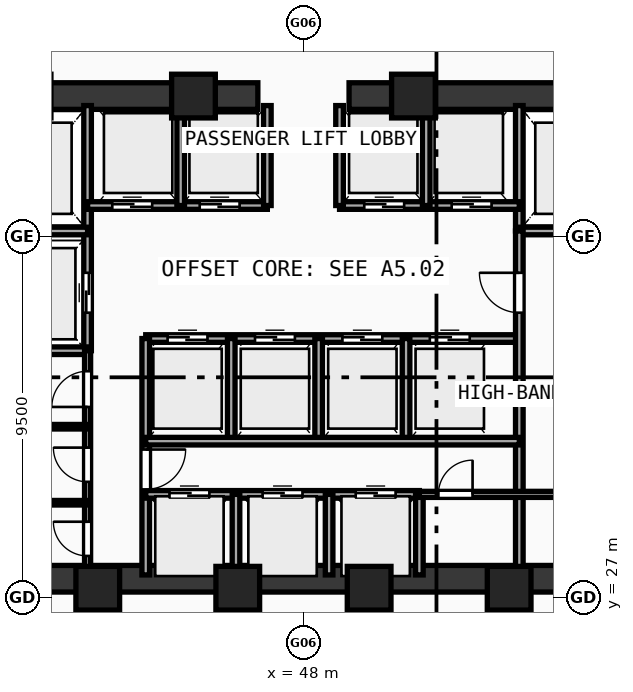
"""IFC4 building model, lengths in metres.
Left out: names, types, materials, properties, quantities, classifications, styles, units other than length and angle.
Written with IfcOpenShell. Run it as: python <this file> out.ifc"""

import sys

from ifc_helpers import new_model, si_unit, direction, frame, frame_2d, origin, origin_with_axes, origin_2d, place, context, subcontext, project, spatial, rectangle, hollow_rectangle, extrude, source, transform, mapped, element, fill, save


model = new_model("IFC4")
c1 = context("Model", 3, precision=1e-05, world=origin(), true_north=direction((0.0, 1.0)))
c2 = subcontext(c1, "Body", "Model", "MODEL_VIEW")
j1 = project(units=[si_unit("LENGTHUNIT", "METRE"), si_unit("PLANEANGLEUNIT", "RADIAN")], contexts=[c1])
p1 = place(None, origin())
s1 = spatial("IfcSite", under=j1, at=p1, CompositionType="ELEMENT")
p2 = place(p1, origin())
s2 = spatial("IfcBuilding", under=s1, at=p2, CompositionType="ELEMENT")
p3 = place(p2, origin())
s3 = spatial("IfcBuildingStorey", under=s2, at=p3, CompositionType="ELEMENT", Elevation=0.0)
p4 = place(p3, frame((35.45, 27.5, 0.0), z_axis=(0.0, 0.0, 1.0), x_axis=(1.0, 0.0, 0.0)))
e1 = element("IfcWall", 1, at=p4, inside=s3, PredefinedType="SHEAR", context=c2, shape_type="SweptSolid", body=[
    extrude(rectangle(XDim=25.1, YDim=0.7, at=frame_2d((12.55, 0.0))), origin(), (0.0, 0.0, 1.0), 4.52),
])
p5 = place(p3, frame((35.45, 40.2, 0.0), z_axis=(0.0, 0.0, 1.0), x_axis=(1.0, 0.0, 0.0)))
e2 = element("IfcWall", 2, at=p5, inside=s3, PredefinedType="SHEAR", context=c2, shape_type="SweptSolid", body=[
    extrude(rectangle(XDim=11.35, YDim=0.7, at=frame_2d((5.675, 0.0))), origin(), (0.0, 0.0, 1.0), 4.52),
])
p6 = place(p5, frame((1.7, 0.0, 0.0)))
e3 = element("IfcOpeningElement", 3, at=p6, cuts=e2, PredefinedType="OPENING", context=c2, shape_type="SweptSolid", body=[
    extrude(rectangle(XDim=1.05, YDim=2.1, at=frame_2d((0.525, 1.05))), frame((0.0, 0.36, 0.0), z_axis=(0.0, -1.0, 0.0), x_axis=(1.0, 0.0, 0.0)), (0.0, 0.0, 1.0), 0.72),
])
p7 = place(p3, frame((49.2, 40.2, 0.0), z_axis=(0.0, 0.0, 1.0), x_axis=(1.0, 0.0, 0.0)))
e4 = element("IfcWall", 4, at=p7, inside=s3, PredefinedType="SHEAR", context=c2, shape_type="SweptSolid", body=[
    extrude(rectangle(XDim=11.35, YDim=0.7, at=frame_2d((5.675, 0.0))), origin(), (0.0, 0.0, 1.0), 4.52),
])
p8 = place(p7, frame((8.6, 0.0, 0.0)))
e5 = element("IfcOpeningElement", 5, at=p8, cuts=e4, PredefinedType="OPENING", context=c2, shape_type="SweptSolid", body=[
    extrude(rectangle(XDim=1.05, YDim=2.1, at=frame_2d((0.525, 1.05))), frame((0.0, 0.36, 0.0), z_axis=(0.0, -1.0, 0.0), x_axis=(1.0, 0.0, 0.0)), (0.0, 0.0, 1.0), 0.72),
])
m1 = source(origin(), c2, "Body", "SweptSolid", [
    extrude(hollow_rectangle(XDim=1.15, YDim=1.15, WallThickness=0.048, at=origin_2d()), origin(), (0.0, 0.0, 1.0), 4.8),
])
for number, where, z_axis, x_axis in (
    (6, (42.588, 27.25, -0.28), (0.0, 0.0, 1.0), (1.0, 0.0, 0.0)),
    (7, (46.272, 27.25, -0.28), (0.0, 0.0, 1.0), (1.0, 0.0, 0.0)),
    (8, (49.729, 27.25, -0.28), (0.0, 0.0, 1.0), (1.0, 0.0, 0.0)),
    (9, (53.412, 27.25, -0.28), (0.0, 0.0, 1.0), (1.0, 0.0, 0.0)),
    (10, (50.894, 40.2, -0.28), (0.0, 0.0, 1.0), (1.0, 0.0, 0.0)),
    (11, (45.106, 40.2, -0.28), (0.0, 0.0, 1.0), (1.0, 0.0, 0.0)),
):
    element("IfcColumn", number, at=place(p3, frame(where, z_axis=z_axis, x_axis=x_axis)), inside=s3, PredefinedType="COLUMN", context=c2, shape_type="MappedRepresentation", body=[
        mapped(m1, transform((0.0, 0.0, 0.0), scale=1.0)),
    ])
p9 = place(p3, frame((42.32, 33.5, 0.0), z_axis=(0.0, 0.0, 1.0), x_axis=(0.0, 1.0, 0.0)))
e12 = element("IfcWall", 12, at=p9, inside=s3, PredefinedType="SOLIDWALL", context=c2, shape_type="SweptSolid", body=[
    extrude(rectangle(XDim=6.45, YDim=0.2, at=frame_2d((3.225, 0.0))), origin(), (0.0, 0.0, 1.0), 4.52),
])
p10 = place(p9, frame((1.0, 0.0, 0.0)))
e13 = element("IfcOpeningElement", 13, at=p10, cuts=e12, PredefinedType="OPENING", context=c2, shape_type="SweptSolid", body=[
    extrude(rectangle(XDim=1.05, YDim=2.1, at=frame_2d((0.525, 1.05))), frame((0.0, 0.11, 0.0), z_axis=(0.0, -1.0, 0.0), x_axis=(1.0, 0.0, 0.0)), (0.0, 0.0, 1.0), 0.22),
])
for number, where, z_axis, x_axis in (
    (14, (39.6, 36.65, 0.0), (0.0, 0.0, 1.0), (1.0, 0.0, 0.0)),
    (15, (39.6, 33.5, 0.0), (0.0, 0.0, 1.0), (1.0, 0.0, 0.0)),
):
    element("IfcWall", number, at=place(p3, frame(where, z_axis=z_axis, x_axis=x_axis)), inside=s3, PredefinedType="SOLIDWALL", context=c2, shape_type="SweptSolid", body=[
        extrude(rectangle(XDim=2.72, YDim=0.2, at=frame_2d((1.36, 0.0))), origin(), (0.0, 0.0, 1.0), 4.52),
    ])
p11 = place(p3, frame((53.68, 36.65, 0.0), z_axis=(0.0, 0.0, 1.0), x_axis=(0.0, 1.0, 0.0)))
e16 = element("IfcWall", 16, at=p11, inside=s3, PredefinedType="SOLIDWALL", context=c2, shape_type="SweptSolid", body=[
    extrude(rectangle(XDim=3.3, YDim=0.2, at=frame_2d((1.65, 0.0))), origin(), (0.0, 0.0, 1.0), 4.52),
])
p12 = place(p3, frame((53.68, 36.65, 0.0), z_axis=(0.0, 0.0, 1.0), x_axis=(1.0, 0.0, 0.0)))
e17 = element("IfcWall", 17, at=p12, inside=s3, PredefinedType="SOLIDWALL", context=c2, shape_type="SweptSolid", body=[
    extrude(rectangle(XDim=2.72, YDim=0.2, at=frame_2d((1.36, 0.0))), origin(), (0.0, 0.0, 1.0), 4.52),
])
p13 = place(p3, frame((42.32, 37.32, 0.0), z_axis=(0.0, 0.0, 1.0), x_axis=(1.0, 0.0, 0.0)))
e18 = element("IfcWall", 18, at=p13, inside=s3, PredefinedType="SOLIDWALL", context=c2, shape_type="SweptSolid", body=[
    extrude(rectangle(XDim=4.73, YDim=0.2, at=frame_2d((2.365, 0.0))), origin(), (0.0, 0.0, 1.0), 4.52),
])
p14 = place(p13, frame((0.65, 0.0, 0.0)))
e19 = element("IfcOpeningElement", 19, at=p14, cuts=e18, PredefinedType="OPENING", context=c2, shape_type="SweptSolid", body=[
    extrude(rectangle(XDim=1.05, YDim=2.1, at=frame_2d((0.525, 1.05))), frame((0.0, 0.11, 0.0), z_axis=(0.0, -1.0, 0.0), x_axis=(1.0, 0.0, 0.0)), (0.0, 0.0, 1.0), 0.22),
])
p15 = place(p13, frame((2.95, 0.0, 0.0)))
e20 = element("IfcOpeningElement", 20, at=p15, cuts=e18, PredefinedType="OPENING", context=c2, shape_type="SweptSolid", body=[
    extrude(rectangle(XDim=1.05, YDim=2.1, at=frame_2d((0.525, 1.05))), frame((0.0, 0.11, 0.0), z_axis=(0.0, -1.0, 0.0), x_axis=(1.0, 0.0, 0.0)), (0.0, 0.0, 1.0), 0.22),
])
p16 = place(p3, frame((48.95, 37.32, 0.0), z_axis=(0.0, 0.0, 1.0), x_axis=(1.0, 0.0, 0.0)))
e21 = element("IfcWall", 21, at=p16, inside=s3, PredefinedType="SOLIDWALL", context=c2, shape_type="SweptSolid", body=[
    extrude(rectangle(XDim=4.73, YDim=0.2, at=frame_2d((2.365, 0.0))), origin(), (0.0, 0.0, 1.0), 4.52),
])
p17 = place(p16, frame((0.65, 0.0, 0.0)))
e22 = element("IfcOpeningElement", 22, at=p17, cuts=e21, PredefinedType="OPENING", context=c2, shape_type="SweptSolid", body=[
    extrude(rectangle(XDim=1.05, YDim=2.1, at=frame_2d((0.525, 1.05))), frame((0.0, 0.11, 0.0), z_axis=(0.0, -1.0, 0.0), x_axis=(1.0, 0.0, 0.0)), (0.0, 0.0, 1.0), 0.22),
])
p18 = place(p16, frame((2.95, 0.0, 0.0)))
e23 = element("IfcOpeningElement", 23, at=p18, cuts=e21, PredefinedType="OPENING", context=c2, shape_type="SweptSolid", body=[
    extrude(rectangle(XDim=1.05, YDim=2.1, at=frame_2d((0.525, 1.05))), frame((0.0, 0.11, 0.0), z_axis=(0.0, -1.0, 0.0), x_axis=(1.0, 0.0, 0.0)), (0.0, 0.0, 1.0), 0.22),
])
for number, where, z_axis, x_axis in (
    (24, (47.05, 37.32, 0.0), (0.0, 0.0, 1.0), (0.0, 1.0, 0.0)),
    (25, (48.95, 37.32, 0.0), (0.0, 0.0, 1.0), (0.0, 1.0, 0.0)),
    (26, (44.77, 37.32, 0.0), (0.0, 0.0, 1.0), (0.0, 1.0, 0.0)),
    (27, (51.23, 37.32, 0.0), (0.0, 0.0, 1.0), (0.0, 1.0, 0.0)),
):
    element("IfcWall", number, at=place(p3, frame(where, z_axis=z_axis, x_axis=x_axis)), inside=s3, PredefinedType="SOLIDWALL", context=c2, shape_type="SweptSolid", body=[
        extrude(rectangle(XDim=2.63, YDim=0.2, at=frame_2d((1.315, 0.0))), origin(), (0.0, 0.0, 1.0), 4.52),
    ])
p19 = place(p3, frame((43.85, 33.82, 0.0), z_axis=(0.0, 0.0, 1.0), x_axis=(1.0, 0.0, 0.0)))
e28 = element("IfcWall", 28, at=p19, inside=s3, PredefinedType="SOLIDWALL", context=c2, shape_type="SweptSolid", body=[
    extrude(rectangle(XDim=9.83, YDim=0.2, at=frame_2d((4.915, 0.0))), origin(), (0.0, 0.0, 1.0), 4.52),
])
p20 = place(p19, frame((0.575, 0.0, 0.0)))
e29 = element("IfcOpeningElement", 29, at=p20, cuts=e28, PredefinedType="OPENING", context=c2, shape_type="SweptSolid", body=[
    extrude(rectangle(XDim=1.05, YDim=2.1, at=frame_2d((0.525, 1.05))), frame((0.0, 0.11, 0.0), z_axis=(0.0, -1.0, 0.0), x_axis=(1.0, 0.0, 0.0)), (0.0, 0.0, 1.0), 0.22),
])
p21 = place(p19, frame((2.875, 0.0, 0.0)))
e30 = element("IfcOpeningElement", 30, at=p21, cuts=e28, PredefinedType="OPENING", context=c2, shape_type="SweptSolid", body=[
    extrude(rectangle(XDim=1.05, YDim=2.1, at=frame_2d((0.525, 1.05))), frame((0.0, 0.11, 0.0), z_axis=(0.0, -1.0, 0.0), x_axis=(1.0, 0.0, 0.0)), (0.0, 0.0, 1.0), 0.22),
])
p22 = place(p19, frame((5.175, 0.0, 0.0)))
e31 = element("IfcOpeningElement", 31, at=p22, cuts=e28, PredefinedType="OPENING", context=c2, shape_type="SweptSolid", body=[
    extrude(rectangle(XDim=1.05, YDim=2.1, at=frame_2d((0.525, 1.05))), frame((0.0, 0.11, 0.0), z_axis=(0.0, -1.0, 0.0), x_axis=(1.0, 0.0, 0.0)), (0.0, 0.0, 1.0), 0.22),
])
p23 = place(p19, frame((7.475, 0.0, 0.0)))
e32 = element("IfcOpeningElement", 32, at=p23, cuts=e28, PredefinedType="OPENING", context=c2, shape_type="SweptSolid", body=[
    extrude(rectangle(XDim=1.05, YDim=2.1, at=frame_2d((0.525, 1.05))), frame((0.0, 0.11, 0.0), z_axis=(0.0, -1.0, 0.0), x_axis=(1.0, 0.0, 0.0)), (0.0, 0.0, 1.0), 0.22),
])
p24 = place(p3, frame((43.85, 27.6, 0.0), z_axis=(0.0, 0.0, 1.0), x_axis=(0.0, 1.0, 0.0)))
e33 = element("IfcWall", 33, at=p24, inside=s3, PredefinedType="SOLIDWALL", context=c2, shape_type="SweptSolid", body=[
    extrude(rectangle(XDim=6.22, YDim=0.2, at=frame_2d((3.11, 0.0))), origin(), (0.0, 0.0, 1.0), 4.52),
])
p25 = place(p24, frame((2.25, 0.0, 0.0)))
e34 = element("IfcOpeningElement", 34, at=p25, cuts=e33, PredefinedType="OPENING", context=c2, shape_type="SweptSolid", body=[
    extrude(rectangle(XDim=1.05, YDim=2.1, at=frame_2d((0.525, 1.05))), frame((0.0, 0.11, 0.0), z_axis=(0.0, -1.0, 0.0), x_axis=(1.0, 0.0, 0.0)), (0.0, 0.0, 1.0), 0.22),
])
p26 = place(p3, frame((53.68, 27.6, 0.0), z_axis=(0.0, 0.0, 1.0), x_axis=(0.0, 1.0, 0.0)))
e35 = element("IfcWall", 35, at=p26, inside=s3, PredefinedType="SOLIDWALL", context=c2, shape_type="SweptSolid", body=[
    extrude(rectangle(XDim=9.05, YDim=0.2, at=frame_2d((4.525, 0.0))), origin(), (0.0, 0.0, 1.0), 4.52),
])
p27 = place(p26, frame((6.9, 0.0, 0.0)))
e36 = element("IfcOpeningElement", 36, at=p27, cuts=e35, PredefinedType="OPENING", context=c2, shape_type="SweptSolid", body=[
    extrude(rectangle(XDim=1.05, YDim=2.1, at=frame_2d((0.525, 1.05))), frame((0.0, 0.11, 0.0), z_axis=(0.0, -1.0, 0.0), x_axis=(1.0, 0.0, 0.0)), (0.0, 0.0, 1.0), 0.22),
])
for number, where, z_axis, x_axis in (
    (37, (46.1, 31.12, 0.0), (0.0, 0.0, 1.0), (0.0, 1.0, 0.0)),
    (38, (48.4, 31.12, 0.0), (0.0, 0.0, 1.0), (0.0, 1.0, 0.0)),
    (39, (50.7, 31.12, 0.0), (0.0, 0.0, 1.0), (0.0, 1.0, 0.0)),
):
    element("IfcWall", number, at=place(p3, frame(where, z_axis=z_axis, x_axis=x_axis)), inside=s3, PredefinedType="SOLIDWALL", context=c2, shape_type="SweptSolid", body=[
        extrude(rectangle(XDim=2.7, YDim=0.2, at=frame_2d((1.35, 0.0))), origin(), (0.0, 0.0, 1.0), 4.52),
    ])
p28 = place(p3, frame((43.85, 29.72, 0.0), z_axis=(0.0, 0.0, 1.0), x_axis=(1.0, 0.0, 0.0)))
e40 = element("IfcWall", 40, at=p28, inside=s3, PredefinedType="SOLIDWALL", context=c2, shape_type="SweptSolid", body=[
    extrude(rectangle(XDim=7.2, YDim=0.2, at=frame_2d((3.6, 0.0))), origin(), (0.0, 0.0, 1.0), 4.52),
])
p29 = place(p28, frame((0.625, 0.0, 0.0)))
e41 = element("IfcOpeningElement", 41, at=p29, cuts=e40, PredefinedType="OPENING", context=c2, shape_type="SweptSolid", body=[
    extrude(rectangle(XDim=1.05, YDim=2.1, at=frame_2d((0.525, 1.05))), frame((0.0, 0.11, 0.0), z_axis=(0.0, -1.0, 0.0), x_axis=(1.0, 0.0, 0.0)), (0.0, 0.0, 1.0), 0.22),
])
p30 = place(p28, frame((3.075, 0.0, 0.0)))
e42 = element("IfcOpeningElement", 42, at=p30, cuts=e40, PredefinedType="OPENING", context=c2, shape_type="SweptSolid", body=[
    extrude(rectangle(XDim=1.05, YDim=2.1, at=frame_2d((0.525, 1.05))), frame((0.0, 0.11, 0.0), z_axis=(0.0, -1.0, 0.0), x_axis=(1.0, 0.0, 0.0)), (0.0, 0.0, 1.0), 0.22),
])
p31 = place(p28, frame((5.525, 0.0, 0.0)))
e43 = element("IfcOpeningElement", 43, at=p31, cuts=e40, PredefinedType="OPENING", context=c2, shape_type="SweptSolid", body=[
    extrude(rectangle(XDim=1.05, YDim=2.1, at=frame_2d((0.525, 1.05))), frame((0.0, 0.11, 0.0), z_axis=(0.0, -1.0, 0.0), x_axis=(1.0, 0.0, 0.0)), (0.0, 0.0, 1.0), 0.22),
])
p32 = place(p3, frame((51.05, 27.6, 0.0), z_axis=(0.0, 0.0, 1.0), x_axis=(0.0, 1.0, 0.0)))
e44 = element("IfcWall", 44, at=p32, inside=s3, PredefinedType="SOLIDWALL", context=c2, shape_type="SweptSolid", body=[
    extrude(rectangle(XDim=2.12, YDim=0.2, at=frame_2d((1.06, 0.0))), origin(), (0.0, 0.0, 1.0), 4.52),
])
p33 = place(p3, frame((43.85, 31.12, 0.0), z_axis=(0.0, 0.0, 1.0), x_axis=(1.0, 0.0, 0.0)))
e45 = element("IfcWall", 45, at=p33, inside=s3, PredefinedType="SOLIDWALL", context=c2, shape_type="SweptSolid", body=[
    extrude(rectangle(XDim=9.83, YDim=0.2, at=frame_2d((4.915, 0.0))), origin(), (0.0, 0.0, 1.0), 4.52),
])
for number, where, z_axis, x_axis in (
    (46, (46.225, 27.6, 0.0), (0.0, 0.0, 1.0), (0.0, 1.0, 0.0)),
    (47, (48.675, 27.6, 0.0), (0.0, 0.0, 1.0), (0.0, 1.0, 0.0)),
):
    element("IfcWall", number, at=place(p3, frame(where, z_axis=z_axis, x_axis=x_axis)), inside=s3, PredefinedType="SOLIDWALL", context=c2, shape_type="SweptSolid", body=[
        extrude(rectangle(XDim=2.12, YDim=0.2, at=frame_2d((1.06, 0.0))), origin(), (0.0, 0.0, 1.0), 4.52),
    ])
p34 = place(p3, frame((42.32, 27.6, 0.0), z_axis=(0.0, 0.0, 1.0), x_axis=(0.0, 1.0, 0.0)))
e48 = element("IfcWall", 48, at=p34, inside=s3, PredefinedType="PARTITIONING", context=c2, shape_type="SweptSolid", body=[
    extrude(rectangle(XDim=5.9, YDim=0.16, at=frame_2d((2.95, 0.0))), origin(), (0.0, 0.0, 1.0), 4.52),
])
p35 = place(p34, frame((0.5, 0.0, 0.0)))
e49 = element("IfcOpeningElement", 49, at=p35, cuts=e48, PredefinedType="OPENING", context=c2, shape_type="SweptSolid", body=[
    extrude(rectangle(XDim=0.9, YDim=2.1, at=frame_2d((0.45, 1.05))), frame((0.0, 0.09, 0.0), z_axis=(0.0, -1.0, 0.0), x_axis=(1.0, 0.0, 0.0)), (0.0, 0.0, 1.0), 0.18),
])
p36 = place(p34, frame((2.45, 0.0, 0.0)))
e50 = element("IfcOpeningElement", 50, at=p36, cuts=e48, PredefinedType="OPENING", context=c2, shape_type="SweptSolid", body=[
    extrude(rectangle(XDim=0.9, YDim=2.1, at=frame_2d((0.45, 1.05))), frame((0.0, 0.09, 0.0), z_axis=(0.0, -1.0, 0.0), x_axis=(1.0, 0.0, 0.0)), (0.0, 0.0, 1.0), 0.18),
])
p37 = place(p34, frame((4.42, 0.0, 0.0)))
e51 = element("IfcOpeningElement", 51, at=p37, cuts=e48, PredefinedType="OPENING", context=c2, shape_type="SweptSolid", body=[
    extrude(rectangle(XDim=0.94, YDim=2.1, at=frame_2d((0.47, 1.05))), frame((0.0, 0.09, 0.0), z_axis=(0.0, -1.0, 0.0), x_axis=(1.0, 0.0, 0.0)), (0.0, 0.0, 1.0), 0.18),
])
p38 = place(p3, frame((51.05, 29.72, 0.0), z_axis=(0.0, 0.0, 1.0), x_axis=(1.0, 0.0, 0.0)))
e52 = element("IfcWall", 52, at=p38, inside=s3, PredefinedType="PARTITIONING", context=c2, shape_type="SweptSolid", body=[
    extrude(rectangle(XDim=4.07, YDim=0.16, at=frame_2d((2.035, 0.0))), origin(), (0.0, 0.0, 1.0), 4.52),
])
p39 = place(p38, frame((0.5, 0.0, 0.0)))
e53 = element("IfcOpeningElement", 53, at=p39, cuts=e52, PredefinedType="OPENING", context=c2, shape_type="SweptSolid", body=[
    extrude(rectangle(XDim=0.9, YDim=2.1, at=frame_2d((0.45, 1.05))), frame((0.0, 0.09, 0.0), z_axis=(0.0, -1.0, 0.0), x_axis=(1.0, 0.0, 0.0)), (0.0, 0.0, 1.0), 0.18),
])
for number, where, z_axis, x_axis in (
    (54, (39.6, 29.5, 0.0), (0.0, 0.0, 1.0), (1.0, 0.0, 0.0)),
    (55, (39.6, 31.5, 0.0), (0.0, 0.0, 1.0), (1.0, 0.0, 0.0)),
):
    element("IfcWall", number, at=place(p3, frame(where, z_axis=z_axis, x_axis=x_axis)), inside=s3, PredefinedType="PARTITIONING", context=c2, shape_type="SweptSolid", body=[
        extrude(rectangle(XDim=2.72, YDim=0.12, at=frame_2d((1.36, 0.0))), origin(), (0.0, 0.0, 1.0), 4.52),
    ])
m2 = source(origin(), c2, "Body", "SweptSolid", [
    extrude(rectangle(XDim=1.05, YDim=2.1, at=frame_2d((0.525, 1.05))), frame((0.0, 0.025, 0.0), z_axis=(0.0, -1.0, 0.0), x_axis=(1.0, 0.0, 0.0)), (0.0, 0.0, 1.0), 0.05),
])
p40 = place(p10, origin_with_axes())
e56 = element("IfcDoor", 56, at=p40, inside=s3, OperationType="DOUBLE_DOOR_SLIDING", PredefinedType="DOOR", context=c2, shape_type="MappedRepresentation", body=[
    mapped(m2, transform((0.0, 0.0, 0.0), scale=1.0)),
])
fill(e13, e56)
p41 = place(p14, frame((1.05, 0.0, 0.0), z_axis=(0.0, 0.0, 1.0), x_axis=(-1.0, 0.0, 0.0)))
e57 = element("IfcDoor", 57, at=p41, inside=s3, OperationType="DOUBLE_DOOR_SLIDING", PredefinedType="DOOR", context=c2, shape_type="MappedRepresentation", body=[
    mapped(m2, transform((0.0, 0.0, 0.0), scale=1.0)),
])
fill(e19, e57)
p42 = place(p15, frame((1.05, 0.0, 0.0), z_axis=(0.0, 0.0, 1.0), x_axis=(-1.0, 0.0, 0.0)))
e58 = element("IfcDoor", 58, at=p42, inside=s3, OperationType="DOUBLE_DOOR_SLIDING", PredefinedType="DOOR", context=c2, shape_type="MappedRepresentation", body=[
    mapped(m2, transform((0.0, 0.0, 0.0), scale=1.0)),
])
fill(e20, e58)
p43 = place(p17, frame((1.05, 0.0, 0.0), z_axis=(0.0, 0.0, 1.0), x_axis=(-1.0, 0.0, 0.0)))
e59 = element("IfcDoor", 59, at=p43, inside=s3, OperationType="DOUBLE_DOOR_SLIDING", PredefinedType="DOOR", context=c2, shape_type="MappedRepresentation", body=[
    mapped(m2, transform((0.0, 0.0, 0.0), scale=1.0)),
])
fill(e22, e59)
p44 = place(p18, frame((1.05, 0.0, 0.0), z_axis=(0.0, 0.0, 1.0), x_axis=(-1.0, 0.0, 0.0)))
e60 = element("IfcDoor", 60, at=p44, inside=s3, OperationType="DOUBLE_DOOR_SLIDING", PredefinedType="DOOR", context=c2, shape_type="MappedRepresentation", body=[
    mapped(m2, transform((0.0, 0.0, 0.0), scale=1.0)),
])
fill(e23, e60)
p45 = place(p20, origin_with_axes())
e61 = element("IfcDoor", 61, at=p45, inside=s3, OperationType="DOUBLE_DOOR_SLIDING", PredefinedType="DOOR", context=c2, shape_type="MappedRepresentation", body=[
    mapped(m2, transform((0.0, 0.0, 0.0), scale=1.0)),
])
fill(e29, e61)
p46 = place(p21, origin_with_axes())
e62 = element("IfcDoor", 62, at=p46, inside=s3, OperationType="DOUBLE_DOOR_SLIDING", PredefinedType="DOOR", context=c2, shape_type="MappedRepresentation", body=[
    mapped(m2, transform((0.0, 0.0, 0.0), scale=1.0)),
])
fill(e30, e62)
p47 = place(p22, origin_with_axes())
e63 = element("IfcDoor", 63, at=p47, inside=s3, OperationType="DOUBLE_DOOR_SLIDING", PredefinedType="DOOR", context=c2, shape_type="MappedRepresentation", body=[
    mapped(m2, transform((0.0, 0.0, 0.0), scale=1.0)),
])
fill(e31, e63)
p48 = place(p23, origin_with_axes())
e64 = element("IfcDoor", 64, at=p48, inside=s3, OperationType="DOUBLE_DOOR_SLIDING", PredefinedType="DOOR", context=c2, shape_type="MappedRepresentation", body=[
    mapped(m2, transform((0.0, 0.0, 0.0), scale=1.0)),
])
fill(e32, e64)
p49 = place(p25, frame((1.05, 0.0, 0.0), z_axis=(0.0, 0.0, 1.0), x_axis=(-1.0, 0.0, 0.0)))
e65 = element("IfcDoor", 65, at=p49, inside=s3, OperationType="SINGLE_SWING_LEFT", PredefinedType="DOOR", context=c2, shape_type="MappedRepresentation", body=[
    mapped(m2, transform((0.0, 0.0, 0.0), scale=1.0)),
])
fill(e34, e65)
p50 = place(p27, origin_with_axes())
e66 = element("IfcDoor", 66, at=p50, inside=s3, OperationType="SINGLE_SWING_RIGHT", PredefinedType="DOOR", context=c2, shape_type="MappedRepresentation", body=[
    mapped(m2, transform((0.0, 0.0, 0.0), scale=1.0)),
])
fill(e36, e66)
p51 = place(p29, origin_with_axes())
e67 = element("IfcDoor", 67, at=p51, inside=s3, OperationType="DOUBLE_DOOR_SLIDING", PredefinedType="DOOR", context=c2, shape_type="MappedRepresentation", body=[
    mapped(m2, transform((0.0, 0.0, 0.0), scale=1.0)),
])
fill(e41, e67)
p52 = place(p30, origin_with_axes())
e68 = element("IfcDoor", 68, at=p52, inside=s3, OperationType="DOUBLE_DOOR_SLIDING", PredefinedType="DOOR", context=c2, shape_type="MappedRepresentation", body=[
    mapped(m2, transform((0.0, 0.0, 0.0), scale=1.0)),
])
fill(e42, e68)
p53 = place(p31, origin_with_axes())
e69 = element("IfcDoor", 69, at=p53, inside=s3, OperationType="DOUBLE_DOOR_SLIDING", PredefinedType="DOOR", context=c2, shape_type="MappedRepresentation", body=[
    mapped(m2, transform((0.0, 0.0, 0.0), scale=1.0)),
])
fill(e43, e69)
m3 = source(origin(), c2, "Body", "SweptSolid", [
    extrude(rectangle(XDim=0.9, YDim=2.1, at=frame_2d((0.45, 1.05))), frame((0.0, 0.025, 0.0), z_axis=(0.0, -1.0, 0.0), x_axis=(1.0, 0.0, 0.0)), (0.0, 0.0, 1.0), 0.05),
])
p54 = place(p35, origin_with_axes())
e70 = element("IfcDoor", 70, at=p54, inside=s3, OperationType="SINGLE_SWING_RIGHT", PredefinedType="DOOR", context=c2, shape_type="MappedRepresentation", body=[
    mapped(m3, transform((0.0, 0.0, 0.0), scale=1.0)),
])
fill(e49, e70)
p55 = place(p36, origin_with_axes())
e71 = element("IfcDoor", 71, at=p55, inside=s3, OperationType="SINGLE_SWING_RIGHT", PredefinedType="DOOR", context=c2, shape_type="MappedRepresentation", body=[
    mapped(m3, transform((0.0, 0.0, 0.0), scale=1.0)),
])
fill(e50, e71)
m4 = source(origin(), c2, "Body", "SweptSolid", [
    extrude(rectangle(XDim=0.94, YDim=2.1, at=frame_2d((0.47, 1.05))), frame((0.0, 0.025, 0.0), z_axis=(0.0, -1.0, 0.0), x_axis=(1.0, 0.0, 0.0)), (0.0, 0.0, 1.0), 0.05),
])
p56 = place(p37, origin_with_axes())
e72 = element("IfcDoor", 72, at=p56, inside=s3, OperationType="SINGLE_SWING_LEFT", PredefinedType="DOOR", context=c2, shape_type="MappedRepresentation", body=[
    mapped(m4, transform((0.0, 0.0, 0.0), scale=1.0)),
])
fill(e51, e72)
p57 = place(p39, origin_with_axes())
e73 = element("IfcDoor", 73, at=p57, inside=s3, OperationType="SINGLE_SWING_RIGHT", PredefinedType="DOOR", context=c2, shape_type="MappedRepresentation", body=[
    mapped(m3, transform((0.0, 0.0, 0.0), scale=1.0)),
])
fill(e53, e73)
save(model, sys.argv[1])
